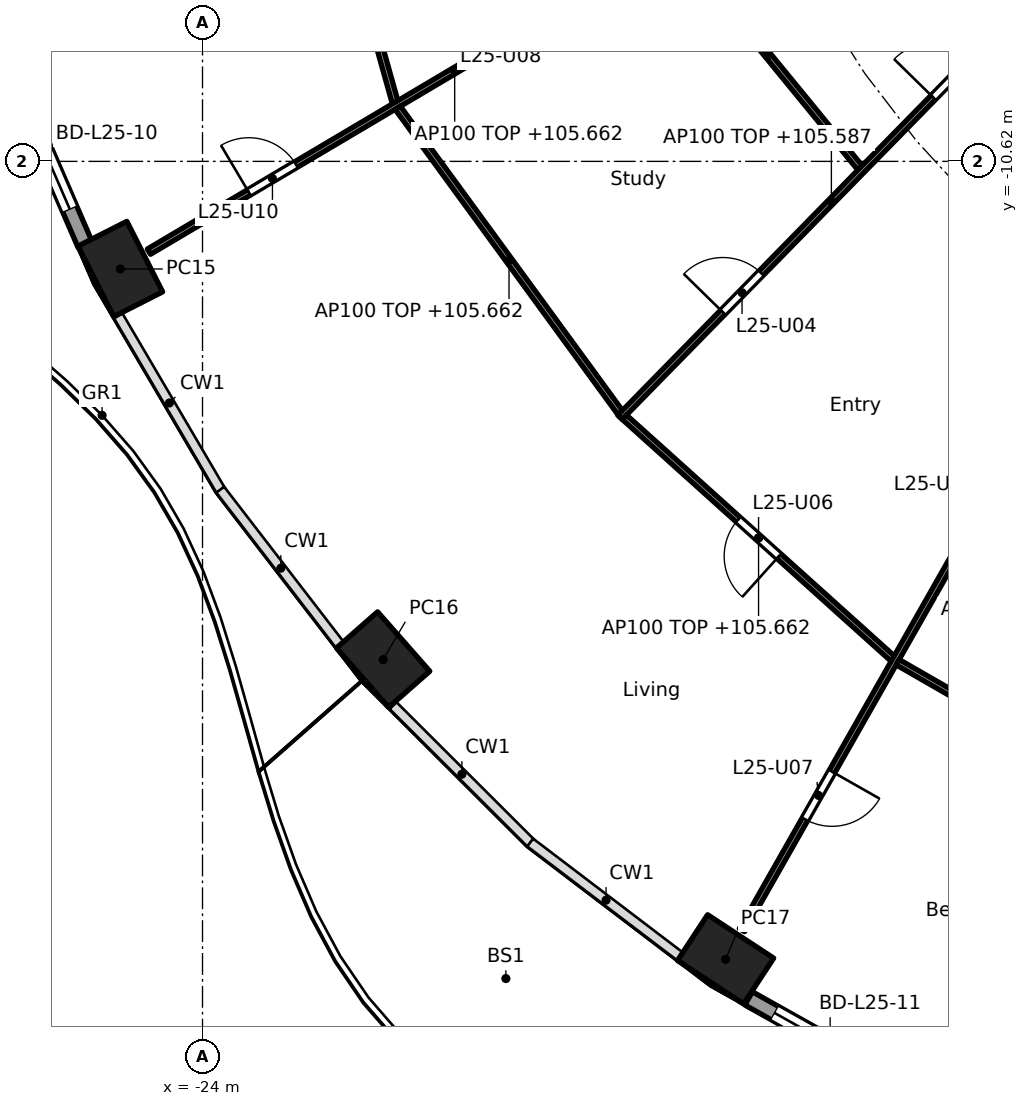
"""IFC4 building model, lengths in metres.
Left out: names, types, materials, properties, quantities, classifications, styles, units other than length and angle.
Written with IfcOpenShell. Run it as: python <this file> out.ifc"""

import sys

from ifc_helpers import new_model, si_unit, direction, frame, frame_2d, origin, origin_2d, place, context, subcontext, project, spatial, rectangle, hollow_rectangle, extrude, element, fill, save


model = new_model("IFC4")
c1 = context("Model", 3, precision=1e-05, world=origin(), true_north=direction((0.0, 1.0)))
c2 = subcontext(c1, "Body", "Model", "MODEL_VIEW")
j1 = project(units=[si_unit("LENGTHUNIT", "METRE"), si_unit("PLANEANGLEUNIT", "RADIAN")], contexts=[c1])
p1 = place(None, origin())
s1 = spatial("IfcSite", under=j1, at=p1, CompositionType="ELEMENT")
p2 = place(p1, origin())
s2 = spatial("IfcBuilding", under=s1, at=p2, CompositionType="ELEMENT")
p3 = place(p2, frame((0.0, 0.0, 102.9)))
s3 = spatial("IfcBuildingStorey", under=s2, at=p3, CompositionType="ELEMENT", Elevation=102.9)
for number, where, z_axis, x_axis in (
    (1, (-25.352, -12.39, 0.0), (0.0, 0.0, 1.0), (0.452, -0.892, 0.0)),
    (2, (-21.03, -18.813, 0.0), (0.0, 0.0, 1.0), (0.66, -0.751, 0.0)),
    (3, (-15.397, -23.742, 0.0), (0.0, 0.0, 1.0), (0.836, -0.549, 0.0)),
):
    element("IfcColumn", number, at=place(p3, frame(where, z_axis=z_axis, x_axis=x_axis)), inside=s3, PredefinedType="COLUMN", context=c2, shape_type="SweptSolid", body=[
        extrude(hollow_rectangle(XDim=1.3, YDim=0.9, WallThickness=0.045, at=origin_2d()), origin(), (0.0, 0.0, 1.0), 3.7),
    ])
p4 = place(p3, frame((-25.928, -11.994, 0.0), z_axis=(0.0, 0.0, 1.0), x_axis=(-0.397682447205, 0.917523117521, 0.0)))
e4 = element("IfcWall", 4, at=p4, inside=s3, PredefinedType="SOLIDWALL", context=c2, shape_type="SweptSolid", body=[
    extrude(rectangle(XDim=3.38, YDim=0.25, at=frame_2d((1.69, 0.0))), origin(), (0.0, 0.0, 1.0), 3.44),
])
p5 = place(p4, frame((0.64, 0.0, 0.0)))
e5 = element("IfcOpeningElement", 5, at=p5, cuts=e4, PredefinedType="OPENING", context=c2, shape_type="SweptSolid", body=[
    extrude(rectangle(XDim=2.1, YDim=2.4, at=frame_2d((1.05, 1.2))), frame((0.0, 0.135, 0.0), z_axis=(0.0, -1.0, 0.0), x_axis=(1.0, 0.0, 0.0)), (0.0, 0.0, 1.0), 0.27),
])
p6 = place(p3, frame((-12.337, -25.889, 0.0), z_axis=(0.0, 0.0, 1.0), x_axis=(-0.872090167423, 0.489345215451, 0.0)))
e6 = element("IfcWall", 6, at=p6, inside=s3, PredefinedType="SOLIDWALL", context=c2, shape_type="SweptSolid", body=[
    extrude(rectangle(XDim=3.076, YDim=0.25, at=frame_2d((1.538, 0.0))), origin(), (0.0, 0.0, 1.0), 3.44),
])
p7 = place(p6, frame((0.488, 0.0, 0.0)))
e7 = element("IfcOpeningElement", 7, at=p7, cuts=e6, PredefinedType="OPENING", context=c2, shape_type="SweptSolid", body=[
    extrude(rectangle(XDim=2.1, YDim=2.4, at=frame_2d((1.05, 1.2))), frame((0.0, 0.135, 0.0), z_axis=(0.0, -1.0, 0.0), x_axis=(1.0, 0.0, 0.0)), (0.0, 0.0, 1.0), 0.27),
])
p8 = place(p3, frame((-12.635, -5.134, 0.0), z_axis=(0.0, 0.0, 1.0), x_axis=(0.707106781187, -0.707106781187, 0.0)))
e8 = element("IfcWall", 8, at=p8, inside=s3, PredefinedType="PARTITIONING", context=c2, shape_type="SweptSolid", body=[
    extrude(rectangle(XDim=10.609, YDim=0.2, at=frame_2d((5.305, 0.0))), origin(), (0.0, 0.0, 1.0), 3.44),
])
p9 = place(p8, frame((4.804, 0.0, 0.0)))
e9 = element("IfcOpeningElement", 9, at=p9, cuts=e8, PredefinedType="OPENING", context=c2, shape_type="SweptSolid", body=[
    extrude(rectangle(XDim=1.0, YDim=2.1, at=frame_2d((0.5, 1.05))), frame((0.0, 0.11, 0.0), z_axis=(0.0, -1.0, 0.0), x_axis=(1.0, 0.0, 0.0)), (0.0, 0.0, 1.0), 0.22),
])
p10 = place(p3, frame((-22.463, -3.832, 0.0), z_axis=(0.0, 0.0, 1.0), x_axis=(0.269797759333, -0.962917010473, 0.0)))
e10 = element("IfcWall", 10, at=p10, inside=s3, PredefinedType="PARTITIONING", context=c2, shape_type="SweptSolid", body=[
    extrude(rectangle(XDim=6.043, YDim=0.1, at=frame_2d((3.021, 0.0))), origin(), (0.0, 0.0, 1.0), 2.762),
])
p11 = place(p3, frame((-14.825, -6.148, 0.0), z_axis=(0.0, 0.0, 1.0), x_axis=(-0.860400431487, -0.509618580408, 0.0)))
e11 = element("IfcWall", 11, at=p11, inside=s3, PredefinedType="PARTITIONING", context=c2, shape_type="SweptSolid", body=[
    extrude(rectangle(XDim=11.688, YDim=0.1, at=frame_2d((5.844, 0.0))), origin(), (0.0, 0.0, 1.0), 2.762),
])
p12 = place(p11, frame((3.858, 0.0, 0.0)))
e12 = element("IfcOpeningElement", 12, at=p12, cuts=e11, PredefinedType="OPENING", context=c2, shape_type="SweptSolid", body=[
    extrude(rectangle(XDim=0.9, YDim=2.1, at=frame_2d((0.45, 1.05))), frame((0.0, 0.06, 0.0), z_axis=(0.0, -1.0, 0.0), x_axis=(1.0, 0.0, 0.0)), (0.0, 0.0, 1.0), 0.12),
])
p13 = place(p11, frame((8.877, 0.0, 0.0)))
e13 = element("IfcOpeningElement", 13, at=p13, cuts=e11, PredefinedType="OPENING", context=c2, shape_type="SweptSolid", body=[
    extrude(rectangle(XDim=0.9, YDim=2.1, at=frame_2d((0.45, 1.05))), frame((0.0, 0.06, 0.0), z_axis=(0.0, -1.0, 0.0), x_axis=(1.0, 0.0, 0.0)), (0.0, 0.0, 1.0), 0.12),
])
p14 = place(p3, frame((-16.214, -7.028, 0.0), z_axis=(0.0, 0.0, 1.0), x_axis=(0.633396341139, -0.773827548639, 0.0)))
e14 = element("IfcWall", 14, at=p14, inside=s3, PredefinedType="PARTITIONING", context=c2, shape_type="SweptSolid", body=[
    extrude(rectangle(XDim=4.779, YDim=0.1, at=frame_2d((2.39, 0.0))), origin(), (0.0, 0.0, 1.0), 2.762),
])
p15 = place(p3, frame((-20.79, -9.739, 0.0), z_axis=(0.0, 0.0, 1.0), x_axis=(0.589611246748, -0.807687178126, 0.0)))
e15 = element("IfcWall", 15, at=p15, inside=s3, PredefinedType="PARTITIONING", context=c2, shape_type="SweptSolid", body=[
    extrude(rectangle(XDim=6.208, YDim=0.1, at=frame_2d((3.104, 0.0))), origin(), (0.0, 0.0, 1.0), 2.762),
])
p16 = place(p3, frame((-10.181, -7.729, 0.0), z_axis=(0.0, 0.0, 1.0), x_axis=(-0.699710752188, -0.714426247609, 0.0)))
e16 = element("IfcWall", 16, at=p16, inside=s3, PredefinedType="PARTITIONING", context=c2, shape_type="SweptSolid", body=[
    extrude(rectangle(XDim=9.938, YDim=0.1, at=frame_2d((4.969, 0.0))), origin(), (0.0, 0.0, 1.0), 2.687),
])
p17 = place(p16, frame((1.675, 0.0, 0.0)))
e17 = element("IfcOpeningElement", 17, at=p17, cuts=e16, PredefinedType="OPENING", context=c2, shape_type="SweptSolid", body=[
    extrude(rectangle(XDim=0.9, YDim=2.1, at=frame_2d((0.45, 1.05))), frame((0.0, 0.06, 0.0), z_axis=(0.0, -1.0, 0.0), x_axis=(1.0, 0.0, 0.0)), (0.0, 0.0, 1.0), 0.12),
])
p18 = place(p16, frame((6.619, 0.0, 0.0)))
e18 = element("IfcOpeningElement", 18, at=p18, cuts=e16, PredefinedType="OPENING", context=c2, shape_type="SweptSolid", body=[
    extrude(rectangle(XDim=0.9, YDim=2.1, at=frame_2d((0.45, 1.05))), frame((0.0, 0.06, 0.0), z_axis=(0.0, -1.0, 0.0), x_axis=(1.0, 0.0, 0.0)), (0.0, 0.0, 1.0), 0.12),
])
p19 = place(p3, frame((-17.063, -14.827, 0.0), z_axis=(0.0, 0.0, 1.0), x_axis=(0.743478142868, -0.668760234373, 0.0)))
e19 = element("IfcWall", 19, at=p19, inside=s3, PredefinedType="PARTITIONING", context=c2, shape_type="SweptSolid", body=[
    extrude(rectangle(XDim=5.937, YDim=0.1, at=frame_2d((2.969, 0.0))), origin(), (0.0, 0.0, 1.0), 2.762),
])
p20 = place(p19, frame((2.519, 0.0, 0.0)))
e20 = element("IfcOpeningElement", 20, at=p20, cuts=e19, PredefinedType="OPENING", context=c2, shape_type="SweptSolid", body=[
    extrude(rectangle(XDim=0.9, YDim=2.1, at=frame_2d((0.45, 1.05))), frame((0.0, 0.06, 0.0), z_axis=(0.0, -1.0, 0.0), x_axis=(1.0, 0.0, 0.0)), (0.0, 0.0, 1.0), 0.12),
])
p21 = place(p3, frame((-7.707, -10.198, 0.0), z_axis=(0.0, 0.0, 1.0), x_axis=(-0.49395524734, -0.869487328042, 0.0)))
e21 = element("IfcWall", 21, at=p21, inside=s3, PredefinedType="PARTITIONING", context=c2, shape_type="SweptSolid", body=[
    extrude(rectangle(XDim=15.025, YDim=0.1, at=frame_2d((7.512, 0.0))), origin(), (0.0, 0.0, 1.0), 2.687),
])
p22 = place(p21, frame((1.684, 0.0, 0.0)))
e22 = element("IfcOpeningElement", 22, at=p22, cuts=e21, PredefinedType="OPENING", context=c2, shape_type="SweptSolid", body=[
    extrude(rectangle(XDim=0.9, YDim=2.1, at=frame_2d((0.45, 1.05))), frame((0.0, 0.06, 0.0), z_axis=(0.0, -1.0, 0.0), x_axis=(1.0, 0.0, 0.0)), (0.0, 0.0, 1.0), 0.12),
])
p23 = place(p21, frame((6.648, 0.0, 0.0)))
e23 = element("IfcOpeningElement", 23, at=p23, cuts=e21, PredefinedType="OPENING", context=c2, shape_type="SweptSolid", body=[
    extrude(rectangle(XDim=0.9, YDim=2.1, at=frame_2d((0.45, 1.05))), frame((0.0, 0.06, 0.0), z_axis=(0.0, -1.0, 0.0), x_axis=(1.0, 0.0, 0.0)), (0.0, 0.0, 1.0), 0.12),
])
p24 = place(p21, frame((12.027, 0.0, 0.0)))
e24 = element("IfcOpeningElement", 24, at=p24, cuts=e21, PredefinedType="OPENING", context=c2, shape_type="SweptSolid", body=[
    extrude(rectangle(XDim=0.9, YDim=2.1, at=frame_2d((0.45, 1.05))), frame((0.0, 0.06, 0.0), z_axis=(0.0, -1.0, 0.0), x_axis=(1.0, 0.0, 0.0)), (0.0, 0.0, 1.0), 0.12),
])
p25 = place(p3, frame((-12.568, -18.856, 0.0), z_axis=(0.0, 0.0, 1.0), x_axis=(0.866533437451, -0.499119025664, 0.0)))
e25 = element("IfcWall", 25, at=p25, inside=s3, PredefinedType="PARTITIONING", context=c2, shape_type="SweptSolid", body=[
    extrude(rectangle(XDim=5.535, YDim=0.1, at=frame_2d((2.768, 0.0))), origin(), (0.0, 0.0, 1.0), 2.762),
])
p26 = place(p25, frame((3.714, 0.0, 0.0)))
e26 = element("IfcOpeningElement", 26, at=p26, cuts=e25, PredefinedType="OPENING", context=c2, shape_type="SweptSolid", body=[
    extrude(rectangle(XDim=0.9, YDim=2.1, at=frame_2d((0.45, 1.05))), frame((0.0, 0.06, 0.0), z_axis=(0.0, -1.0, 0.0), x_axis=(1.0, 0.0, 0.0)), (0.0, 0.0, 1.0), 0.12),
])
p27 = place(p5, origin())
e27 = element("IfcDoor", 27, at=p27, inside=s3, OperationType="SLIDING_TO_LEFT", PredefinedType="DOOR", context=c2, shape_type="SweptSolid", body=[
    extrude(rectangle(XDim=2.1, YDim=2.4, at=frame_2d((1.05, 1.2))), frame((0.0, 0.025, 0.0), z_axis=(0.0, -1.0, 0.0), x_axis=(1.0, 0.0, 0.0)), (0.0, 0.0, 1.0), 0.05),
])
fill(e5, e27)
p28 = place(p7, origin())
e28 = element("IfcDoor", 28, at=p28, inside=s3, OperationType="SLIDING_TO_LEFT", PredefinedType="DOOR", context=c2, shape_type="SweptSolid", body=[
    extrude(rectangle(XDim=2.1, YDim=2.4, at=frame_2d((1.05, 1.2))), frame((0.0, 0.025, 0.0), z_axis=(0.0, -1.0, 0.0), x_axis=(1.0, 0.0, 0.0)), (0.0, 0.0, 1.0), 0.05),
])
fill(e7, e28)
p29 = place(p17, frame((0.9, 0.0, 0.0), x_axis=(-1.0, 0.0, 0.0)))
e29 = element("IfcDoor", 29, at=p29, inside=s3, OperationType="SINGLE_SWING_LEFT", PredefinedType="DOOR", context=c2, shape_type="SweptSolid", body=[
    extrude(rectangle(XDim=0.9, YDim=2.1, at=frame_2d((0.45, 1.05))), frame((0.0, 0.025, 0.0), z_axis=(0.0, -1.0, 0.0), x_axis=(1.0, 0.0, 0.0)), (0.0, 0.0, 1.0), 0.05),
])
fill(e17, e29)
p30 = place(p18, frame((0.9, 0.0, 0.0), x_axis=(-1.0, 0.0, 0.0)))
e30 = element("IfcDoor", 30, at=p30, inside=s3, OperationType="SINGLE_SWING_LEFT", PredefinedType="DOOR", context=c2, shape_type="SweptSolid", body=[
    extrude(rectangle(XDim=0.9, YDim=2.1, at=frame_2d((0.45, 1.05))), frame((0.0, 0.025, 0.0), z_axis=(0.0, -1.0, 0.0), x_axis=(1.0, 0.0, 0.0)), (0.0, 0.0, 1.0), 0.05),
])
fill(e18, e30)
p31 = place(p20, frame((0.9, 0.0, 0.0), x_axis=(-1.0, 0.0, 0.0)))
e31 = element("IfcDoor", 31, at=p31, inside=s3, OperationType="SINGLE_SWING_LEFT", PredefinedType="DOOR", context=c2, shape_type="SweptSolid", body=[
    extrude(rectangle(XDim=0.9, YDim=2.1, at=frame_2d((0.45, 1.05))), frame((0.0, 0.025, 0.0), z_axis=(0.0, -1.0, 0.0), x_axis=(1.0, 0.0, 0.0)), (0.0, 0.0, 1.0), 0.05),
])
fill(e20, e31)
p32 = place(p24, origin())
e32 = element("IfcDoor", 32, at=p32, inside=s3, OperationType="SINGLE_SWING_LEFT", PredefinedType="DOOR", context=c2, shape_type="SweptSolid", body=[
    extrude(rectangle(XDim=0.9, YDim=2.1, at=frame_2d((0.45, 1.05))), frame((0.0, 0.025, 0.0), z_axis=(0.0, -1.0, 0.0), x_axis=(1.0, 0.0, 0.0)), (0.0, 0.0, 1.0), 0.05),
])
fill(e24, e32)
p33 = place(p13, frame((0.9, 0.0, 0.0), x_axis=(-1.0, 0.0, 0.0)))
e33 = element("IfcDoor", 33, at=p33, inside=s3, OperationType="SINGLE_SWING_LEFT", PredefinedType="DOOR", context=c2, shape_type="SweptSolid", body=[
    extrude(rectangle(XDim=0.9, YDim=2.1, at=frame_2d((0.45, 1.05))), frame((0.0, 0.025, 0.0), z_axis=(0.0, -1.0, 0.0), x_axis=(1.0, 0.0, 0.0)), (0.0, 0.0, 1.0), 0.05),
])
fill(e13, e33)
save(model, sys.argv[1])
